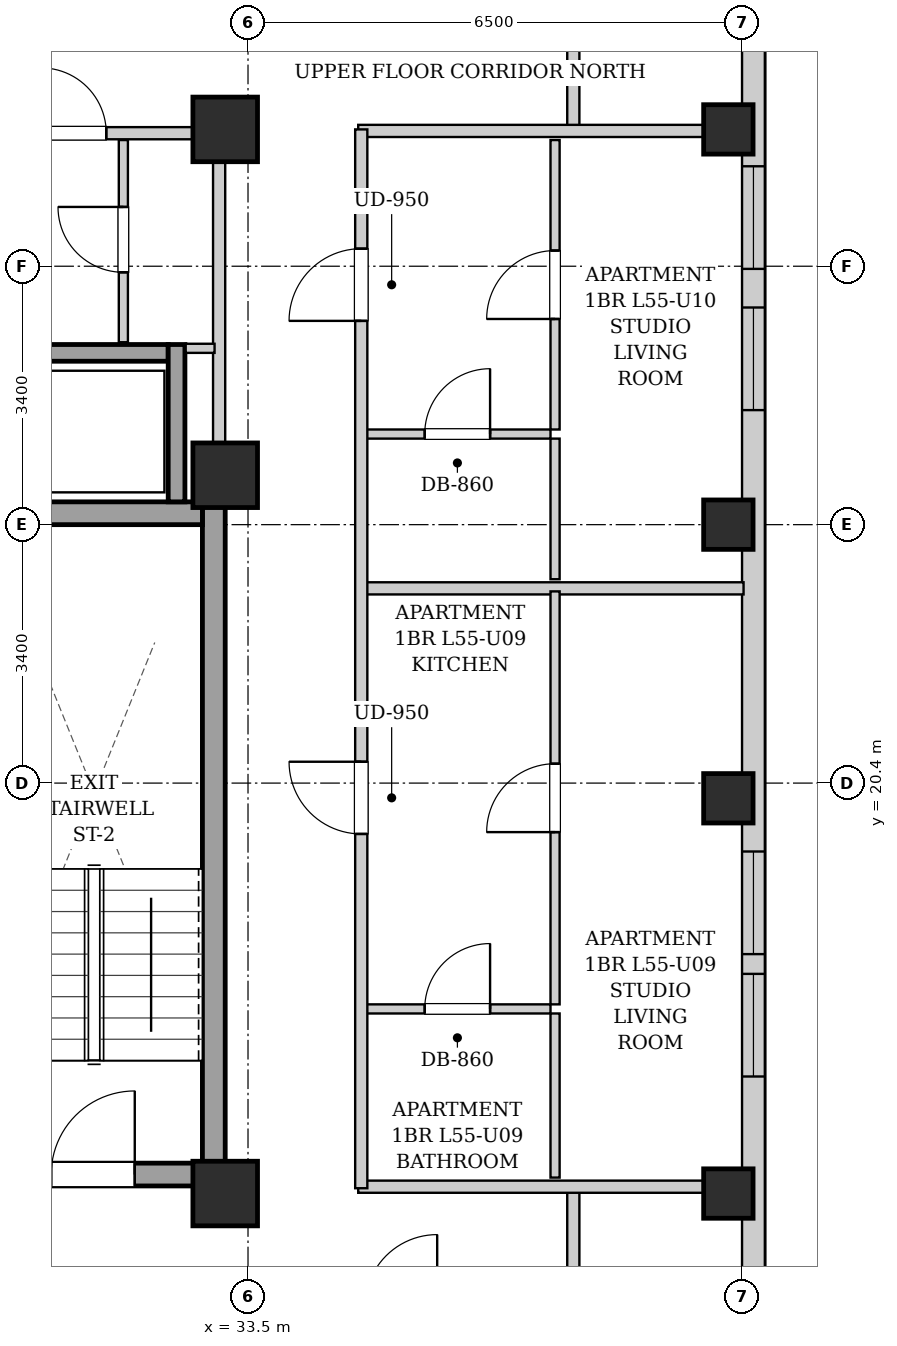
"""IFC4 building model, lengths in metres.
Left out: names, types, materials, properties, quantities, classifications, styles, units other than length and angle.
Written with IfcOpenShell. Run it as: python <this file> out.ifc"""

import sys

from ifc_helpers import new_model, si_unit, direction, frame, frame_2d, origin, origin_2d, place, context, subcontext, project, spatial, rectangle, extrude, element, fill, save


model = new_model("IFC4")
c1 = context("Model", 3, precision=1e-05, world=origin(), true_north=direction((0.0, 1.0)))
c2 = subcontext(c1, "Body", "Model", "MODEL_VIEW")
j1 = project(units=[si_unit("LENGTHUNIT", "METRE"), si_unit("PLANEANGLEUNIT", "RADIAN")], contexts=[c1])
p1 = place(None, origin())
s1 = spatial("IfcSite", under=j1, at=p1, CompositionType="ELEMENT")
p2 = place(p1, origin())
s2 = spatial("IfcBuilding", under=s1, at=p2, CompositionType="ELEMENT")
p3 = place(p2, frame((0.0, 0.0, 190.9)))
s3 = spatial("IfcBuildingStorey", under=s2, at=p3, CompositionType="ELEMENT", Elevation=190.9)
for number, where, z_axis, x_axis in (
    (1, (39.82, 15.0, 0.0), (0.0, 0.0, 1.0), (1.0, 0.0, 0.0)),
    (2, (39.82, 20.2, 0.0), (0.0, 0.0, 1.0), (1.0, 0.0, 0.0)),
    (3, (39.82, 23.8, 0.0), (0.0, 0.0, 1.0), (1.0, 0.0, 0.0)),
    (4, (39.82, 29.0, 0.0), (0.0, 0.0, 1.0), (1.0, 0.0, 0.0)),
):
    element("IfcColumn", number, at=place(p3, frame(where, z_axis=z_axis, x_axis=x_axis)), inside=s3, PredefinedType="COLUMN", context=c2, shape_type="SweptSolid", body=[
        extrude(rectangle(XDim=0.65, YDim=0.65, at=origin_2d()), origin(), (0.0, 0.0, 1.0), 3.3),
    ])
for number, where, z_axis, x_axis in (
    (5, (33.2, 15.0, 0.0), (0.0, 0.0, 1.0), (1.0, 0.0, 0.0)),
    (6, (33.2, 29.0, 0.0), (0.0, 0.0, 1.0), (1.0, 0.0, 0.0)),
    (7, (33.2, 24.45, 0.0), (0.0, 0.0, 1.0), (1.0, 0.0, 0.0)),
):
    element("IfcColumn", number, at=place(p3, frame(where, z_axis=z_axis, x_axis=x_axis)), inside=s3, PredefinedType="COLUMN", context=c2, shape_type="SweptSolid", body=[
        extrude(rectangle(XDim=0.85, YDim=0.85, at=origin_2d()), origin(), (0.0, 0.0, 1.0), 3.3),
    ])
p4 = place(p3, frame((40.15, 37.7, 0.0), z_axis=(0.0, 0.0, 1.0), x_axis=(0.0, -1.0, 0.0)))
e8 = element("IfcWall", 8, at=p4, inside=s3, PredefinedType="SOLIDWALL", context=c2, shape_type="SweptSolid", body=[
    extrude(rectangle(XDim=31.4, YDim=0.3, at=frame_2d((15.7, 0.0))), origin(), (0.0, 0.0, 1.0), 3.04),
])
p5 = place(p4, frame((1.504, 0.0, 0.55)))
e9 = element("IfcOpeningElement", 9, at=p5, cuts=e8, PredefinedType="OPENING", context=c2, shape_type="SweptSolid", body=[
    extrude(rectangle(XDim=1.35, YDim=1.2, at=frame_2d((0.675, 0.6))), frame((0.0, 0.16, 0.0), z_axis=(0.0, -1.0, 0.0), x_axis=(1.0, 0.0, 0.0)), (0.0, 0.0, 1.0), 0.32),
])
p6 = place(p4, frame((18.2, 0.0, 0.55)))
e10 = element("IfcOpeningElement", 10, at=p6, cuts=e8, PredefinedType="OPENING", context=c2, shape_type="SweptSolid", body=[
    extrude(rectangle(XDim=1.35, YDim=1.2, at=frame_2d((0.675, 0.6))), frame((0.0, 0.16, 0.0), z_axis=(0.0, -1.0, 0.0), x_axis=(1.0, 0.0, 0.0)), (0.0, 0.0, 1.0), 0.32),
])
p7 = place(p4, frame((19.81, 0.0, 0.55)))
e11 = element("IfcOpeningElement", 11, at=p7, cuts=e8, PredefinedType="OPENING", context=c2, shape_type="SweptSolid", body=[
    extrude(rectangle(XDim=1.35, YDim=1.2, at=frame_2d((0.675, 0.6))), frame((0.0, 0.16, 0.0), z_axis=(0.0, -1.0, 0.0), x_axis=(1.0, 0.0, 0.0)), (0.0, 0.0, 1.0), 0.32),
])
p8 = place(p4, frame((11.043, 0.0, 0.55)))
e12 = element("IfcOpeningElement", 12, at=p8, cuts=e8, PredefinedType="OPENING", context=c2, shape_type="SweptSolid", body=[
    extrude(rectangle(XDim=1.35, YDim=1.2, at=frame_2d((0.675, 0.6))), frame((0.0, 0.16, 0.0), z_axis=(0.0, -1.0, 0.0), x_axis=(1.0, 0.0, 0.0)), (0.0, 0.0, 1.0), 0.32),
])
p9 = place(p4, frame((9.185, 0.0, 0.55)))
e13 = element("IfcOpeningElement", 13, at=p9, cuts=e8, PredefinedType="OPENING", context=c2, shape_type="SweptSolid", body=[
    extrude(rectangle(XDim=1.35, YDim=1.2, at=frame_2d((0.675, 0.6))), frame((0.0, 0.16, 0.0), z_axis=(0.0, -1.0, 0.0), x_axis=(1.0, 0.0, 0.0)), (0.0, 0.0, 1.0), 0.32),
])
p10 = place(p3, frame((33.05, 15.1, 0.0), z_axis=(0.0, 0.0, 1.0), x_axis=(0.0, 1.0, 0.0)))
e14 = element("IfcWall", 14, at=p10, inside=s3, PredefinedType="SHEAR", context=c2, shape_type="SweptSolid", body=[
    extrude(rectangle(XDim=9.0, YDim=0.3, at=frame_2d((4.5, 0.0))), origin(), (0.0, 0.0, 1.0), 3.04),
])
p11 = place(p3, frame((30.05, 23.95, 0.0), z_axis=(0.0, 0.0, 1.0), x_axis=(1.0, 0.0, 0.0)))
e15 = element("IfcWall", 15, at=p11, inside=s3, PredefinedType="SHEAR", context=c2, shape_type="SweptSolid", body=[
    extrude(rectangle(XDim=2.85, YDim=0.3, at=frame_2d((1.425, 0.0))), origin(), (0.0, 0.0, 1.0), 3.04),
])
p12 = place(p3, frame((30.05, 15.25, 0.0), z_axis=(0.0, 0.0, 1.0), x_axis=(1.0, 0.0, 0.0)))
e16 = element("IfcWall", 16, at=p12, inside=s3, PredefinedType="SHEAR", context=c2, shape_type="SweptSolid", body=[
    extrude(rectangle(XDim=2.85, YDim=0.3, at=frame_2d((1.425, 0.0))), origin(), (0.0, 0.0, 1.0), 3.04),
])
p13 = place(p12, frame((0.86, 0.0, 0.0)))
e17 = element("IfcOpeningElement", 17, at=p13, cuts=e16, PredefinedType="OPENING", context=c2, shape_type="SweptSolid", body=[
    extrude(rectangle(XDim=1.1, YDim=2.05, at=frame_2d((0.55, 1.025))), frame((0.0, 0.16, 0.0), z_axis=(0.0, -1.0, 0.0), x_axis=(1.0, 0.0, 0.0)), (0.0, 0.0, 1.0), 0.32),
])
p14 = place(p3, frame((30.55, 26.06, 0.0), z_axis=(0.0, 0.0, 1.0), x_axis=(1.0, 0.0, 0.0)))
e18 = element("IfcWall", 18, at=p14, inside=s3, PredefinedType="SHEAR", context=c2, shape_type="SweptSolid", body=[
    extrude(rectangle(XDim=1.9, YDim=0.22, at=frame_2d((0.95, 0.0))), origin(), (0.0, 0.0, 1.0), 3.04),
])
p15 = place(p3, frame((32.56, 24.1, 0.0), z_axis=(0.0, 0.0, 1.0), x_axis=(0.0, 1.0, 0.0)))
e19 = element("IfcWall", 19, at=p15, inside=s3, PredefinedType="SHEAR", context=c2, shape_type="SweptSolid", body=[
    extrude(rectangle(XDim=2.07, YDim=0.22, at=frame_2d((1.035, 0.0))), origin(), (0.0, 0.0, 1.0), 3.04),
])
p16 = place(p3, frame((33.12, 24.12, 0.0), z_axis=(0.0, 0.0, 1.0), x_axis=(0.0, 1.0, 0.0)))
e20 = element("IfcWall", 20, at=p16, inside=s3, PredefinedType="PARTITIONING", context=c2, shape_type="SweptSolid", body=[
    extrude(rectangle(XDim=4.76, YDim=0.16, at=frame_2d((2.38, 0.0))), origin(), (0.0, 0.0, 1.0), 3.04),
])
p17 = place(p3, frame((32.68, 26.12, 0.0), z_axis=(0.0, 0.0, 1.0), x_axis=(1.0, 0.0, 0.0)))
e21 = element("IfcWall", 21, at=p17, inside=s3, PredefinedType="PARTITIONING", context=c2, shape_type="SweptSolid", body=[
    extrude(rectangle(XDim=0.38, YDim=0.12, at=frame_2d((0.19, 0.0))), origin(), (0.0, 0.0, 1.0), 3.04),
])
p18 = place(p3, frame((31.86, 26.2, 0.0), z_axis=(0.0, 0.0, 1.0), x_axis=(0.0, 1.0, 0.0)))
e22 = element("IfcWall", 22, at=p18, inside=s3, PredefinedType="PARTITIONING", context=c2, shape_type="SweptSolid", body=[
    extrude(rectangle(XDim=2.66, YDim=0.12, at=frame_2d((1.33, 0.0))), origin(), (0.0, 0.0, 1.0), 3.04),
])
p19 = place(p18, frame((0.92, 0.0, 0.0)))
e23 = element("IfcOpeningElement", 23, at=p19, cuts=e22, PredefinedType="OPENING", context=c2, shape_type="SweptSolid", body=[
    extrude(rectangle(XDim=0.86, YDim=2.05, at=frame_2d((0.43, 1.025))), frame((0.0, 0.07, 0.0), z_axis=(0.0, -1.0, 0.0), x_axis=(1.0, 0.0, 0.0)), (0.0, 0.0, 1.0), 0.14),
])
p20 = place(p3, frame((30.08, 28.95, 0.0), z_axis=(0.0, 0.0, 1.0), x_axis=(1.0, 0.0, 0.0)))
e24 = element("IfcWall", 24, at=p20, inside=s3, PredefinedType="PARTITIONING", context=c2, shape_type="SweptSolid", body=[
    extrude(rectangle(XDim=2.96, YDim=0.16, at=frame_2d((1.48, 0.0))), origin(), (0.0, 0.0, 1.0), 3.04),
])
p21 = place(p20, frame((0.695, 0.0, 0.0)))
e25 = element("IfcOpeningElement", 25, at=p21, cuts=e24, PredefinedType="OPENING", context=c2, shape_type="SweptSolid", body=[
    extrude(rectangle(XDim=0.86, YDim=2.05, at=frame_2d((0.43, 1.025))), frame((0.0, 0.09, 0.0), z_axis=(0.0, -1.0, 0.0), x_axis=(1.0, 0.0, 0.0)), (0.0, 0.0, 1.0), 0.18),
])
for number, where, z_axis, x_axis in (
    (26, (37.78, 13.51, 0.0), (0.0, 0.0, 1.0), (0.0, 1.0, 0.0)),
    (27, (37.78, 28.98, 0.0), (0.0, 0.0, 1.0), (0.0, 1.0, 0.0)),
):
    element("IfcWall", number, at=place(p3, frame(where, z_axis=z_axis, x_axis=x_axis)), inside=s3, PredefinedType="PARTITIONING", context=c2, shape_type="SweptSolid", body=[
        extrude(rectangle(XDim=1.58, YDim=0.16, at=frame_2d((0.79, 0.0))), origin(), (0.0, 0.0, 1.0), 3.04),
    ])
for number, where, z_axis, x_axis in (
    (28, (34.95, 15.09, 0.0), (0.0, 0.0, 1.0), (1.0, 0.0, 0.0)),
    (29, (34.95, 28.98, 0.0), (0.0, 0.0, 1.0), (1.0, 0.0, 0.0)),
):
    element("IfcWall", number, at=place(p3, frame(where, z_axis=z_axis, x_axis=x_axis)), inside=s3, PredefinedType="PARTITIONING", context=c2, shape_type="SweptSolid", body=[
        extrude(rectangle(XDim=5.07, YDim=0.16, at=frame_2d((2.535, 0.0))), origin(), (0.0, 0.0, 1.0), 2.556),
    ])
p22 = place(p3, frame((35.03, 22.962, 0.0), z_axis=(0.0, 0.0, 1.0), x_axis=(1.0, 0.0, 0.0)))
e30 = element("IfcWall", 30, at=p22, inside=s3, PredefinedType="PARTITIONING", context=c2, shape_type="SweptSolid", body=[
    extrude(rectangle(XDim=4.99, YDim=0.16, at=frame_2d((2.495, 0.0))), origin(), (0.0, 0.0, 1.0), 3.04),
])
p23 = place(p3, frame((35.03, 17.429, 0.0), z_axis=(0.0, 0.0, 1.0), x_axis=(1.0, 0.0, 0.0)))
e31 = element("IfcWall", 31, at=p23, inside=s3, PredefinedType="PARTITIONING", context=c2, shape_type="SweptSolid", body=[
    extrude(rectangle(XDim=2.45, YDim=0.12, at=frame_2d((1.225, 0.0))), origin(), (0.0, 0.0, 1.0), 3.04),
])
p24 = place(p23, frame((0.795, 0.0, 0.0)))
e32 = element("IfcOpeningElement", 32, at=p24, cuts=e31, PredefinedType="OPENING", context=c2, shape_type="SweptSolid", body=[
    extrude(rectangle(XDim=0.86, YDim=2.05, at=frame_2d((0.43, 1.025))), frame((0.0, 0.07, 0.0), z_axis=(0.0, -1.0, 0.0), x_axis=(1.0, 0.0, 0.0)), (0.0, 0.0, 1.0), 0.14),
])
p25 = place(p3, frame((37.54, 15.21, 0.0), z_axis=(0.0, 0.0, 1.0), x_axis=(0.0, 1.0, 0.0)))
e33 = element("IfcWall", 33, at=p25, inside=s3, PredefinedType="PARTITIONING", context=c2, shape_type="SweptSolid", body=[
    extrude(rectangle(XDim=2.159, YDim=0.12, at=frame_2d((1.08, 0.0))), origin(), (0.0, 0.0, 1.0), 3.04),
])
p26 = place(p3, frame((37.54, 17.489, 0.0), z_axis=(0.0, 0.0, 1.0), x_axis=(0.0, 1.0, 0.0)))
e34 = element("IfcWall", 34, at=p26, inside=s3, PredefinedType="PARTITIONING", context=c2, shape_type="SweptSolid", body=[
    extrude(rectangle(XDim=5.433, YDim=0.12, at=frame_2d((2.717, 0.0))), origin(), (0.0, 0.0, 1.0), 3.04),
])
p27 = place(p26, frame((2.266, 0.0, 0.0)))
e35 = element("IfcOpeningElement", 35, at=p27, cuts=e34, PredefinedType="OPENING", context=c2, shape_type="SweptSolid", body=[
    extrude(rectangle(XDim=0.9, YDim=2.05, at=frame_2d((0.45, 1.025))), frame((0.0, 0.07, 0.0), z_axis=(0.0, -1.0, 0.0), x_axis=(1.0, 0.0, 0.0)), (0.0, 0.0, 1.0), 0.14),
])
p28 = place(p3, frame((35.03, 24.992, 0.0), z_axis=(0.0, 0.0, 1.0), x_axis=(1.0, 0.0, 0.0)))
e36 = element("IfcWall", 36, at=p28, inside=s3, PredefinedType="PARTITIONING", context=c2, shape_type="SweptSolid", body=[
    extrude(rectangle(XDim=2.45, YDim=0.12, at=frame_2d((1.225, 0.0))), origin(), (0.0, 0.0, 1.0), 3.04),
])
p29 = place(p28, frame((0.795, 0.0, 0.0)))
e37 = element("IfcOpeningElement", 37, at=p29, cuts=e36, PredefinedType="OPENING", context=c2, shape_type="SweptSolid", body=[
    extrude(rectangle(XDim=0.86, YDim=2.05, at=frame_2d((0.43, 1.025))), frame((0.0, 0.07, 0.0), z_axis=(0.0, -1.0, 0.0), x_axis=(1.0, 0.0, 0.0)), (0.0, 0.0, 1.0), 0.14),
])
p30 = place(p3, frame((37.54, 23.082, 0.0), z_axis=(0.0, 0.0, 1.0), x_axis=(0.0, 1.0, 0.0)))
e38 = element("IfcWall", 38, at=p30, inside=s3, PredefinedType="PARTITIONING", context=c2, shape_type="SweptSolid", body=[
    extrude(rectangle(XDim=1.85, YDim=0.12, at=frame_2d((0.925, 0.0))), origin(), (0.0, 0.0, 1.0), 3.04),
])
p31 = place(p3, frame((37.54, 25.052, 0.0), z_axis=(0.0, 0.0, 1.0), x_axis=(0.0, 1.0, 0.0)))
e39 = element("IfcWall", 39, at=p31, inside=s3, PredefinedType="PARTITIONING", context=c2, shape_type="SweptSolid", body=[
    extrude(rectangle(XDim=3.808, YDim=0.12, at=frame_2d((1.904, 0.0))), origin(), (0.0, 0.0, 1.0), 3.04),
])
p32 = place(p31, frame((1.454, 0.0, 0.0)))
e40 = element("IfcOpeningElement", 40, at=p32, cuts=e39, PredefinedType="OPENING", context=c2, shape_type="SweptSolid", body=[
    extrude(rectangle(XDim=0.9, YDim=2.05, at=frame_2d((0.45, 1.025))), frame((0.0, 0.07, 0.0), z_axis=(0.0, -1.0, 0.0), x_axis=(1.0, 0.0, 0.0)), (0.0, 0.0, 1.0), 0.14),
])
p33 = place(p3, frame((34.99, 15.07, 0.0), z_axis=(0.0, 0.0, 1.0), x_axis=(0.0, 1.0, 0.0)))
e41 = element("IfcWall", 41, at=p33, inside=s3, PredefinedType="PARTITIONING", context=c2, shape_type="SweptSolid", body=[
    extrude(rectangle(XDim=13.93, YDim=0.16, at=frame_2d((6.965, 0.0))), origin(), (0.0, 0.0, 1.0), 3.04),
])
p34 = place(p33, frame((4.661, 0.0, 0.0)))
e42 = element("IfcOpeningElement", 42, at=p34, cuts=e41, PredefinedType="OPENING", context=c2, shape_type="SweptSolid", body=[
    extrude(rectangle(XDim=0.95, YDim=2.1, at=frame_2d((0.475, 1.05))), frame((0.0, 0.09, 0.0), z_axis=(0.0, -1.0, 0.0), x_axis=(1.0, 0.0, 0.0)), (0.0, 0.0, 1.0), 0.18),
])
p35 = place(p33, frame((11.411, 0.0, 0.0)))
e43 = element("IfcOpeningElement", 43, at=p35, cuts=e41, PredefinedType="OPENING", context=c2, shape_type="SweptSolid", body=[
    extrude(rectangle(XDim=0.95, YDim=2.1, at=frame_2d((0.475, 1.05))), frame((0.0, 0.09, 0.0), z_axis=(0.0, -1.0, 0.0), x_axis=(1.0, 0.0, 0.0)), (0.0, 0.0, 1.0), 0.18),
])
p36 = place(p13, origin())
e44 = element("IfcDoor", 44, at=p36, inside=s3, OperationType="SINGLE_SWING_RIGHT", PredefinedType="DOOR", context=c2, shape_type="SweptSolid", body=[
    extrude(rectangle(XDim=1.1, YDim=2.05, at=frame_2d((0.55, 1.025))), frame((0.0, 0.025, 0.0), z_axis=(0.0, -1.0, 0.0), x_axis=(1.0, 0.0, 0.0)), (0.0, 0.0, 1.0), 0.05),
])
fill(e17, e44)
p37 = place(p19, origin())
e45 = element("IfcDoor", 45, at=p37, inside=s3, OperationType="SINGLE_SWING_RIGHT", PredefinedType="DOOR", context=c2, shape_type="SweptSolid", body=[
    extrude(rectangle(XDim=0.86, YDim=2.05, at=frame_2d((0.43, 1.025))), frame((0.0, 0.025, 0.0), z_axis=(0.0, -1.0, 0.0), x_axis=(1.0, 0.0, 0.0)), (0.0, 0.0, 1.0), 0.05),
])
fill(e23, e45)
p38 = place(p21, origin())
e46 = element("IfcDoor", 46, at=p38, inside=s3, OperationType="SINGLE_SWING_LEFT", PredefinedType="DOOR", context=c2, shape_type="SweptSolid", body=[
    extrude(rectangle(XDim=0.86, YDim=2.05, at=frame_2d((0.43, 1.025))), frame((0.0, 0.025, 0.0), z_axis=(0.0, -1.0, 0.0), x_axis=(1.0, 0.0, 0.0)), (0.0, 0.0, 1.0), 0.05),
])
fill(e25, e46)
p39 = place(p24, origin())
e47 = element("IfcDoor", 47, at=p39, inside=s3, OperationType="SINGLE_SWING_RIGHT", PredefinedType="DOOR", context=c2, shape_type="SweptSolid", body=[
    extrude(rectangle(XDim=0.86, YDim=2.05, at=frame_2d((0.43, 1.025))), frame((0.0, 0.025, 0.0), z_axis=(0.0, -1.0, 0.0), x_axis=(1.0, 0.0, 0.0)), (0.0, 0.0, 1.0), 0.05),
])
fill(e32, e47)
p40 = place(p27, origin())
e48 = element("IfcDoor", 48, at=p40, inside=s3, OperationType="SINGLE_SWING_LEFT", PredefinedType="DOOR", context=c2, shape_type="SweptSolid", body=[
    extrude(rectangle(XDim=0.9, YDim=2.05, at=frame_2d((0.45, 1.025))), frame((0.0, 0.025, 0.0), z_axis=(0.0, -1.0, 0.0), x_axis=(1.0, 0.0, 0.0)), (0.0, 0.0, 1.0), 0.05),
])
fill(e35, e48)
p41 = place(p29, origin())
e49 = element("IfcDoor", 49, at=p41, inside=s3, OperationType="SINGLE_SWING_RIGHT", PredefinedType="DOOR", context=c2, shape_type="SweptSolid", body=[
    extrude(rectangle(XDim=0.86, YDim=2.05, at=frame_2d((0.43, 1.025))), frame((0.0, 0.025, 0.0), z_axis=(0.0, -1.0, 0.0), x_axis=(1.0, 0.0, 0.0)), (0.0, 0.0, 1.0), 0.05),
])
fill(e37, e49)
p42 = place(p32, origin())
e50 = element("IfcDoor", 50, at=p42, inside=s3, OperationType="SINGLE_SWING_LEFT", PredefinedType="DOOR", context=c2, shape_type="SweptSolid", body=[
    extrude(rectangle(XDim=0.9, YDim=2.05, at=frame_2d((0.45, 1.025))), frame((0.0, 0.025, 0.0), z_axis=(0.0, -1.0, 0.0), x_axis=(1.0, 0.0, 0.0)), (0.0, 0.0, 1.0), 0.05),
])
fill(e40, e50)
p43 = place(p34, origin())
e51 = element("IfcDoor", 51, at=p43, inside=s3, OperationType="SINGLE_SWING_RIGHT", PredefinedType="DOOR", context=c2, shape_type="SweptSolid", body=[
    extrude(rectangle(XDim=0.95, YDim=2.1, at=frame_2d((0.475, 1.05))), frame((0.0, 0.025, 0.0), z_axis=(0.0, -1.0, 0.0), x_axis=(1.0, 0.0, 0.0)), (0.0, 0.0, 1.0), 0.05),
])
fill(e42, e51)
p44 = place(p35, origin())
e52 = element("IfcDoor", 52, at=p44, inside=s3, OperationType="SINGLE_SWING_LEFT", PredefinedType="DOOR", context=c2, shape_type="SweptSolid", body=[
    extrude(rectangle(XDim=0.95, YDim=2.1, at=frame_2d((0.475, 1.05))), frame((0.0, 0.025, 0.0), z_axis=(0.0, -1.0, 0.0), x_axis=(1.0, 0.0, 0.0)), (0.0, 0.0, 1.0), 0.05),
])
fill(e43, e52)
p45 = place(p6, origin())
e53 = element("IfcWindow", 53, at=p45, inside=s3, PartitioningType="SINGLE_PANEL", PredefinedType="WINDOW", context=c2, shape_type="SweptSolid", body=[
    extrude(rectangle(XDim=1.35, YDim=1.2, at=frame_2d((0.675, 0.6))), frame((0.0, 0.03, 0.0), z_axis=(0.0, -1.0, 0.0), x_axis=(1.0, 0.0, 0.0)), (0.0, 0.0, 1.0), 0.06),
])
fill(e10, e53)
p46 = place(p7, origin())
e54 = element("IfcWindow", 54, at=p46, inside=s3, PartitioningType="SINGLE_PANEL", PredefinedType="WINDOW", context=c2, shape_type="SweptSolid", body=[
    extrude(rectangle(XDim=1.35, YDim=1.2, at=frame_2d((0.675, 0.6))), frame((0.0, 0.03, 0.0), z_axis=(0.0, -1.0, 0.0), x_axis=(1.0, 0.0, 0.0)), (0.0, 0.0, 1.0), 0.06),
])
fill(e11, e54)
p47 = place(p8, origin())
e55 = element("IfcWindow", 55, at=p47, inside=s3, PartitioningType="SINGLE_PANEL", PredefinedType="WINDOW", context=c2, shape_type="SweptSolid", body=[
    extrude(rectangle(XDim=1.35, YDim=1.2, at=frame_2d((0.675, 0.6))), frame((0.0, 0.03, 0.0), z_axis=(0.0, -1.0, 0.0), x_axis=(1.0, 0.0, 0.0)), (0.0, 0.0, 1.0), 0.06),
])
fill(e12, e55)
p48 = place(p9, origin())
e56 = element("IfcWindow", 56, at=p48, inside=s3, PartitioningType="SINGLE_PANEL", PredefinedType="WINDOW", context=c2, shape_type="SweptSolid", body=[
    extrude(rectangle(XDim=1.35, YDim=1.2, at=frame_2d((0.675, 0.6))), frame((0.0, 0.03, 0.0), z_axis=(0.0, -1.0, 0.0), x_axis=(1.0, 0.0, 0.0)), (0.0, 0.0, 1.0), 0.06),
])
fill(e13, e56)
save(model, sys.argv[1])
